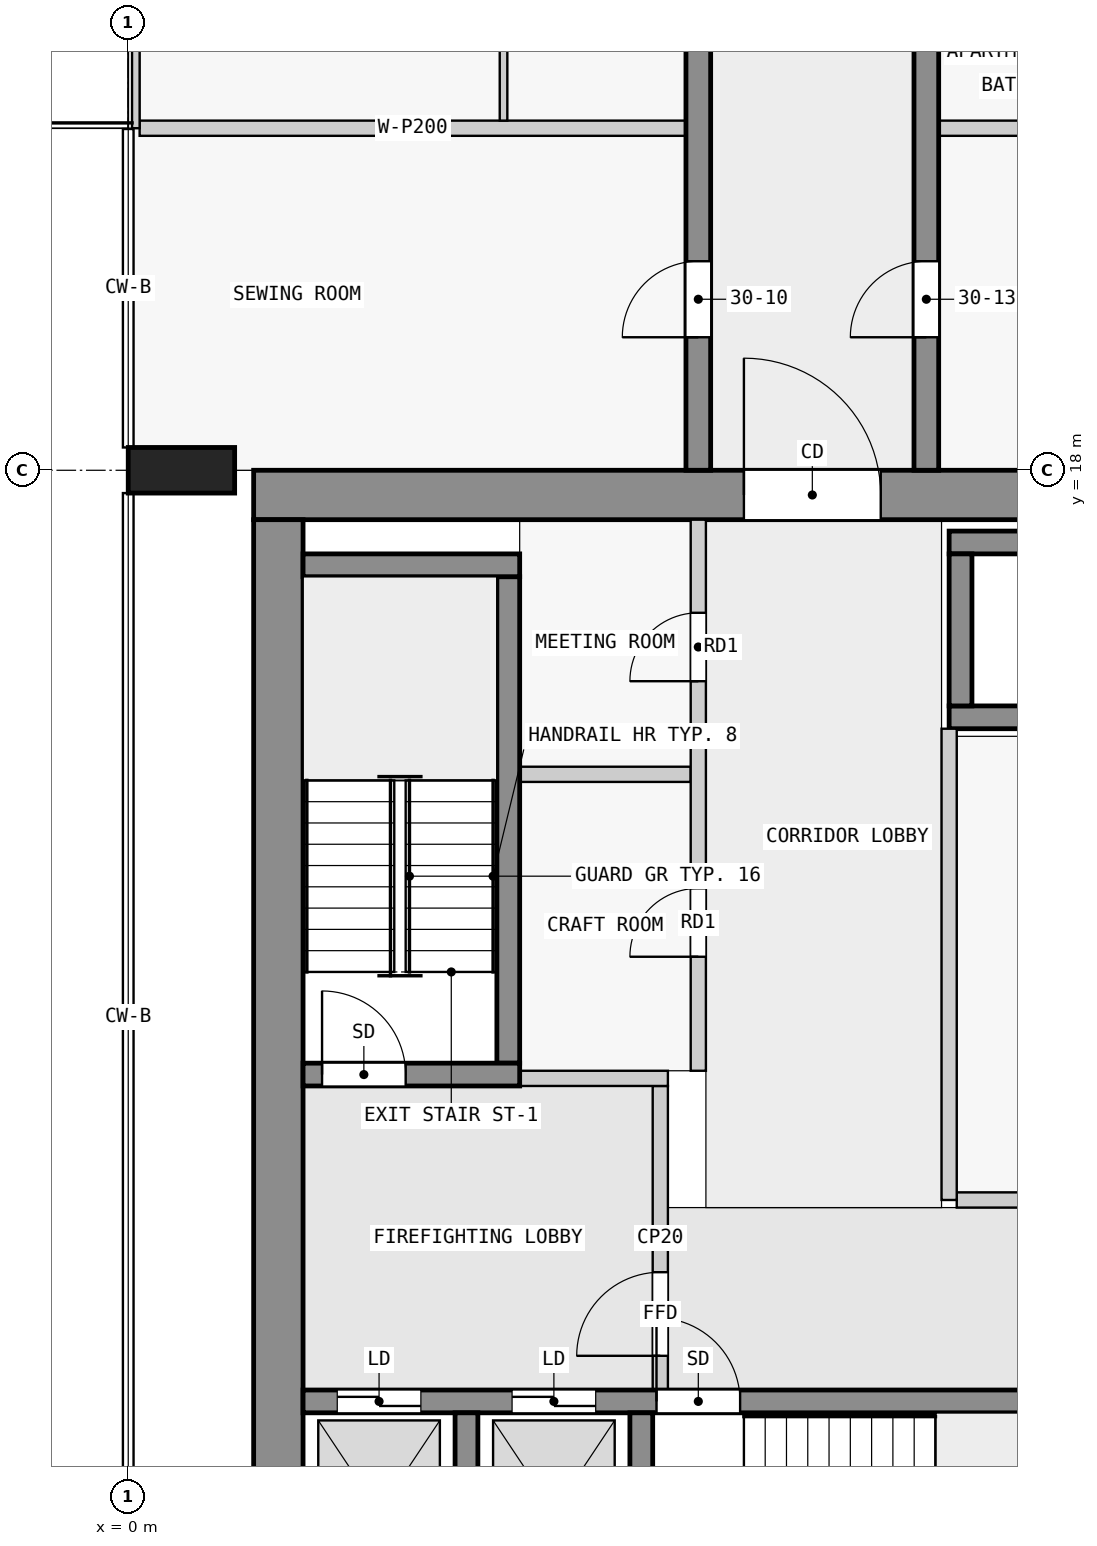
"""IFC4 building model, lengths in metres.
Left out: names, types, materials, properties, quantities, classifications, styles, units other than length and angle.
Written with IfcOpenShell. Run it as: python <this file> out.ifc"""

import sys

from ifc_helpers import new_model, si_unit, direction, frame, frame_2d, origin, origin_2d, place, context, subcontext, project, spatial, rectangle, extrude, element, fill, save


model = new_model("IFC4")
c1 = context("Model", 3, precision=1e-05, world=origin(), true_north=direction((0.0, 1.0)))
c2 = subcontext(c1, "Body", "Model", "MODEL_VIEW")
j1 = project(units=[si_unit("LENGTHUNIT", "METRE"), si_unit("PLANEANGLEUNIT", "RADIAN")], contexts=[c1])
p1 = place(None, origin())
s1 = spatial("IfcSite", under=j1, at=p1, CompositionType="ELEMENT")
p2 = place(p1, origin())
s2 = spatial("IfcBuilding", under=s1, at=p2, CompositionType="ELEMENT")
p3 = place(p2, frame((0.0, 0.0, 116.8)))
s3 = spatial("IfcBuildingStorey", under=s2, at=p3, CompositionType="ELEMENT", Elevation=116.8)
p4 = place(p3, frame((0.7, 18.0, 0.0), z_axis=(0.0, 0.0, 1.0), x_axis=(0.0, 1.0, 0.0)))
e1 = element("IfcColumn", 1, at=p4, inside=s3, PredefinedType="COLUMN", context=c2, shape_type="SweptSolid", body=[
    extrude(rectangle(XDim=0.6, YDim=1.4, at=origin_2d()), origin(), (0.0, 0.0, 1.0), 3.5),
])
p5 = place(p3, frame((1.65, 17.675, 0.0), z_axis=(0.0, 0.0, 1.0), x_axis=(1.0, 0.0, 0.0)))
e2 = element("IfcWall", 2, at=p5, inside=s3, PredefinedType="SHEAR", context=c2, shape_type="SweptSolid", body=[
    extrude(rectangle(XDim=20.85, YDim=0.65, at=frame_2d((10.425, 0.0))), origin(), (0.0, 0.0, 1.0), 3.25),
])
p6 = place(p5, frame((6.45, 0.0, 0.0)))
e3 = element("IfcOpeningElement", 3, at=p6, cuts=e2, PredefinedType="OPENING", context=c2, shape_type="SweptSolid", body=[
    extrude(rectangle(XDim=1.8, YDim=2.1, at=frame_2d((0.9, 1.05))), frame((0.0, 0.335, 0.0), z_axis=(0.0, -1.0, 0.0), x_axis=(1.0, 0.0, 0.0)), (0.0, 0.0, 1.0), 0.67),
])
p7 = place(p3, frame((1.975, 2.5, 0.0), z_axis=(0.0, 0.0, 1.0), x_axis=(0.0, 1.0, 0.0)))
e4 = element("IfcWall", 4, at=p7, inside=s3, PredefinedType="SHEAR", context=c2, shape_type="SweptSolid", body=[
    extrude(rectangle(XDim=14.85, YDim=0.65, at=frame_2d((7.425, 0.0))), origin(), (0.0, 0.0, 1.0), 3.25),
])
for number, where, z_axis, x_axis in (
    (5, (4.45, 2.8, 0.0), (0.0, 0.0, 1.0), (0.0, 1.0, 0.0)),
    (6, (6.75, 2.8, 0.0), (0.0, 0.0, 1.0), (0.0, 1.0, 0.0)),
):
    element("IfcWall", number, at=place(p3, frame(where, z_axis=z_axis, x_axis=x_axis)), inside=s3, PredefinedType="SHEAR", context=c2, shape_type="SweptSolid", body=[
        extrude(rectangle(XDim=2.8, YDim=0.3, at=frame_2d((1.4, 0.0))), origin(), (0.0, 0.0, 1.0), 3.25),
    ])
p8 = place(p3, frame((2.3, 5.75, 0.0), z_axis=(0.0, 0.0, 1.0), x_axis=(1.0, 0.0, 0.0)))
e7 = element("IfcWall", 7, at=p8, inside=s3, PredefinedType="SHEAR", context=c2, shape_type="SweptSolid", body=[
    extrude(rectangle(XDim=18.8, YDim=0.3, at=frame_2d((9.4, 0.0))), origin(), (0.0, 0.0, 1.0), 3.25),
])
p9 = place(p8, frame((4.65, 0.0, 0.0)))
e8 = element("IfcOpeningElement", 8, at=p9, cuts=e7, PredefinedType="OPENING", context=c2, shape_type="SweptSolid", body=[
    extrude(rectangle(XDim=1.1, YDim=2.1, at=frame_2d((0.55, 1.05))), frame((0.0, 0.16, 0.0), z_axis=(0.0, -1.0, 0.0), x_axis=(1.0, 0.0, 0.0)), (0.0, 0.0, 1.0), 0.32),
])
p10 = place(p8, frame((0.45, 0.0, 0.0)))
e9 = element("IfcOpeningElement", 9, at=p10, cuts=e7, PredefinedType="OPENING", context=c2, shape_type="SweptSolid", body=[
    extrude(rectangle(XDim=1.1, YDim=2.1, at=frame_2d((0.55, 1.05))), frame((0.0, 0.16, 0.0), z_axis=(0.0, -1.0, 0.0), x_axis=(1.0, 0.0, 0.0)), (0.0, 0.0, 1.0), 0.32),
])
p11 = place(p8, frame((2.75, 0.0, 0.0)))
e10 = element("IfcOpeningElement", 10, at=p11, cuts=e7, PredefinedType="OPENING", context=c2, shape_type="SweptSolid", body=[
    extrude(rectangle(XDim=1.1, YDim=2.1, at=frame_2d((0.55, 1.05))), frame((0.0, 0.16, 0.0), z_axis=(0.0, -1.0, 0.0), x_axis=(1.0, 0.0, 0.0)), (0.0, 0.0, 1.0), 0.32),
])
p12 = place(p8, frame((11.85, 0.0, 0.0)))
e11 = element("IfcOpeningElement", 11, at=p12, cuts=e7, PredefinedType="OPENING", context=c2, shape_type="SweptSolid", body=[
    extrude(rectangle(XDim=1.1, YDim=2.1, at=frame_2d((0.55, 1.05))), frame((0.0, 0.16, 0.0), z_axis=(0.0, -1.0, 0.0), x_axis=(1.0, 0.0, 0.0)), (0.0, 0.0, 1.0), 0.32),
])
p13 = place(p8, frame((14.35, 0.0, 0.0)))
e12 = element("IfcOpeningElement", 12, at=p13, cuts=e7, PredefinedType="OPENING", context=c2, shape_type="SweptSolid", body=[
    extrude(rectangle(XDim=1.1, YDim=2.1, at=frame_2d((0.55, 1.05))), frame((0.0, 0.16, 0.0), z_axis=(0.0, -1.0, 0.0), x_axis=(1.0, 0.0, 0.0)), (0.0, 0.0, 1.0), 0.32),
])
p14 = place(p8, frame((16.85, 0.0, 0.0)))
e13 = element("IfcOpeningElement", 13, at=p14, cuts=e7, PredefinedType="OPENING", context=c2, shape_type="SweptSolid", body=[
    extrude(rectangle(XDim=1.1, YDim=2.1, at=frame_2d((0.55, 1.05))), frame((0.0, 0.16, 0.0), z_axis=(0.0, -1.0, 0.0), x_axis=(1.0, 0.0, 0.0)), (0.0, 0.0, 1.0), 0.32),
])
p15 = place(p3, frame((2.3, 10.05, 0.0), z_axis=(0.0, 0.0, 1.0), x_axis=(1.0, 0.0, 0.0)))
e14 = element("IfcWall", 14, at=p15, inside=s3, PredefinedType="SHEAR", context=c2, shape_type="SweptSolid", body=[
    extrude(rectangle(XDim=2.85, YDim=0.3, at=frame_2d((1.425, 0.0))), origin(), (0.0, 0.0, 1.0), 3.25),
])
p16 = place(p15, frame((0.25, 0.0, 0.0)))
e15 = element("IfcOpeningElement", 15, at=p16, cuts=e14, PredefinedType="OPENING", context=c2, shape_type="SweptSolid", body=[
    extrude(rectangle(XDim=1.1, YDim=2.1, at=frame_2d((0.55, 1.05))), frame((0.0, 0.16, 0.0), z_axis=(0.0, -1.0, 0.0), x_axis=(1.0, 0.0, 0.0)), (0.0, 0.0, 1.0), 0.32),
])
p17 = place(p3, frame((5.0, 10.2, 0.0), z_axis=(0.0, 0.0, 1.0), x_axis=(0.0, 1.0, 0.0)))
e16 = element("IfcWall", 16, at=p17, inside=s3, PredefinedType="SHEAR", context=c2, shape_type="SweptSolid", body=[
    extrude(rectangle(XDim=6.4, YDim=0.3, at=frame_2d((3.2, 0.0))), origin(), (0.0, 0.0, 1.0), 3.25),
])
p18 = place(p3, frame((2.3, 16.75, 0.0), z_axis=(0.0, 0.0, 1.0), x_axis=(1.0, 0.0, 0.0)))
e17 = element("IfcWall", 17, at=p18, inside=s3, PredefinedType="SHEAR", context=c2, shape_type="SweptSolid", body=[
    extrude(rectangle(XDim=2.85, YDim=0.3, at=frame_2d((1.425, 0.0))), origin(), (0.0, 0.0, 1.0), 3.25),
])
for number, where, z_axis, x_axis in (
    (18, (10.8, 17.05, 0.0), (0.0, 0.0, 1.0), (1.0, 0.0, 0.0)),
    (19, (10.8, 14.75, 0.0), (0.0, 0.0, 1.0), (1.0, 0.0, 0.0)),
):
    element("IfcWall", number, at=place(p3, frame(where, z_axis=z_axis, x_axis=x_axis)), inside=s3, PredefinedType="SHEAR", context=c2, shape_type="SweptSolid", body=[
        extrude(rectangle(XDim=7.8, YDim=0.3, at=frame_2d((3.9, 0.0))), origin(), (0.0, 0.0, 1.0), 3.25),
    ])
p19 = place(p3, frame((10.95, 14.9, 0.0), z_axis=(0.0, 0.0, 1.0), x_axis=(0.0, 1.0, 0.0)))
e20 = element("IfcWall", 20, at=p19, inside=s3, PredefinedType="SHEAR", context=c2, shape_type="SweptSolid", body=[
    extrude(rectangle(XDim=2.0, YDim=0.3, at=frame_2d((1.0, 0.0))), origin(), (0.0, 0.0, 1.0), 3.25),
])
p20 = place(p3, frame((7.5, 18.0, 0.0), z_axis=(0.0, 0.0, 1.0), x_axis=(0.0, 1.0, 0.0)))
e21 = element("IfcWall", 21, at=p20, inside=s3, PredefinedType="SHEAR", context=c2, shape_type="SweptSolid", body=[
    extrude(rectangle(XDim=27.0, YDim=0.325, at=frame_2d((13.5, 0.0))), origin(), (0.0, 0.0, 1.0), 3.25),
])
p21 = place(p20, frame((1.75, 0.0, 0.0)))
e22 = element("IfcOpeningElement", 22, at=p21, cuts=e21, PredefinedType="OPENING", context=c2, shape_type="SweptSolid", body=[
    extrude(rectangle(XDim=1.0, YDim=2.1, at=frame_2d((0.5, 1.05))), frame((0.0, 0.172, 0.0), z_axis=(0.0, -1.0, 0.0), x_axis=(1.0, 0.0, 0.0)), (0.0, 0.0, 1.0), 0.345),
])
p22 = place(p20, frame((9.25, 0.0, 0.0)))
e23 = element("IfcOpeningElement", 23, at=p22, cuts=e21, PredefinedType="OPENING", context=c2, shape_type="SweptSolid", body=[
    extrude(rectangle(XDim=1.0, YDim=2.1, at=frame_2d((0.5, 1.05))), frame((0.0, 0.172, 0.0), z_axis=(0.0, -1.0, 0.0), x_axis=(1.0, 0.0, 0.0)), (0.0, 0.0, 1.0), 0.345),
])
p23 = place(p20, frame((21.35, 0.0, 0.0)))
e24 = element("IfcOpeningElement", 24, at=p23, cuts=e21, PredefinedType="OPENING", context=c2, shape_type="SweptSolid", body=[
    extrude(rectangle(XDim=1.0, YDim=2.1, at=frame_2d((0.5, 1.05))), frame((0.0, 0.172, 0.0), z_axis=(0.0, -1.0, 0.0), x_axis=(1.0, 0.0, 0.0)), (0.0, 0.0, 1.0), 0.345),
])
p24 = place(p3, frame((10.5, 18.0, 0.0), z_axis=(0.0, 0.0, 1.0), x_axis=(0.0, 1.0, 0.0)))
e25 = element("IfcWall", 25, at=p24, inside=s3, PredefinedType="SHEAR", context=c2, shape_type="SweptSolid", body=[
    extrude(rectangle(XDim=27.0, YDim=0.325, at=frame_2d((13.5, 0.0))), origin(), (0.0, 0.0, 1.0), 3.25),
])
p25 = place(p24, frame((1.75, 0.0, 0.0)))
e26 = element("IfcOpeningElement", 26, at=p25, cuts=e25, PredefinedType="OPENING", context=c2, shape_type="SweptSolid", body=[
    extrude(rectangle(XDim=1.0, YDim=2.1, at=frame_2d((0.5, 1.05))), frame((0.0, 0.172, 0.0), z_axis=(0.0, -1.0, 0.0), x_axis=(1.0, 0.0, 0.0)), (0.0, 0.0, 1.0), 0.345),
])
p26 = place(p24, frame((6.25, 0.0, 0.0)))
e27 = element("IfcOpeningElement", 27, at=p26, cuts=e25, PredefinedType="OPENING", context=c2, shape_type="SweptSolid", body=[
    extrude(rectangle(XDim=1.0, YDim=2.1, at=frame_2d((0.5, 1.05))), frame((0.0, 0.172, 0.0), z_axis=(0.0, -1.0, 0.0), x_axis=(1.0, 0.0, 0.0)), (0.0, 0.0, 1.0), 0.345),
])
p27 = place(p24, frame((13.05, 0.0, 0.0)))
e28 = element("IfcOpeningElement", 28, at=p27, cuts=e25, PredefinedType="OPENING", context=c2, shape_type="SweptSolid", body=[
    extrude(rectangle(XDim=1.0, YDim=2.1, at=frame_2d((0.5, 1.05))), frame((0.0, 0.172, 0.0), z_axis=(0.0, -1.0, 0.0), x_axis=(1.0, 0.0, 0.0)), (0.0, 0.0, 1.0), 0.345),
])
p28 = place(p24, frame((19.75, 0.0, 0.0)))
e29 = element("IfcOpeningElement", 29, at=p28, cuts=e25, PredefinedType="OPENING", context=c2, shape_type="SweptSolid", body=[
    extrude(rectangle(XDim=1.0, YDim=2.1, at=frame_2d((0.5, 1.05))), frame((0.0, 0.172, 0.0), z_axis=(0.0, -1.0, 0.0), x_axis=(1.0, 0.0, 0.0)), (0.0, 0.0, 1.0), 0.345),
])
p29 = place(p24, frame((23.25, 0.0, 0.0)))
e30 = element("IfcOpeningElement", 30, at=p29, cuts=e25, PredefinedType="OPENING", context=c2, shape_type="SweptSolid", body=[
    extrude(rectangle(XDim=0.9, YDim=2.1, at=frame_2d((0.45, 1.05))), frame((0.0, 0.172, 0.0), z_axis=(0.0, -1.0, 0.0), x_axis=(1.0, 0.0, 0.0)), (0.0, 0.0, 1.0), 0.345),
])
p30 = place(p24, frame((25.45, 0.0, 0.0)))
e31 = element("IfcOpeningElement", 31, at=p30, cuts=e25, PredefinedType="OPENING", context=c2, shape_type="SweptSolid", body=[
    extrude(rectangle(XDim=1.0, YDim=2.1, at=frame_2d((0.5, 1.05))), frame((0.0, 0.172, 0.0), z_axis=(0.0, -1.0, 0.0), x_axis=(1.0, 0.0, 0.0)), (0.0, 0.0, 1.0), 0.345),
])
p31 = place(p3, frame((0.1, 22.5, 0.0), z_axis=(0.0, 0.0, 1.0), x_axis=(0.0, 1.0, 0.0)))
e32 = element("IfcWall", 32, at=p31, inside=s3, PredefinedType="STANDARD", context=c2, shape_type="SweptSolid", body=[
    extrude(rectangle(XDim=4.5, YDim=0.1, at=frame_2d((2.25, 0.0))), origin(), (0.0, 0.0, 1.0), 3.25),
])
p32 = place(p31, frame((1.05, 0.0, 0.0)))
e33 = element("IfcOpeningElement", 33, at=p32, cuts=e32, PredefinedType="OPENING", context=c2, shape_type="SweptSolid", body=[
    extrude(rectangle(XDim=2.4, YDim=2.4, at=frame_2d((1.2, 1.2))), frame((0.0, 0.06, 0.0), z_axis=(0.0, -1.0, 0.0), x_axis=(1.0, 0.0, 0.0)), (0.0, 0.0, 1.0), 0.12),
])
p33 = place(p3, frame((7.0, 5.9, 0.0), z_axis=(0.0, 0.0, 1.0), x_axis=(0.0, 1.0, 0.0)))
e34 = element("IfcWall", 34, at=p33, inside=s3, PredefinedType="PARTITIONING", context=c2, shape_type="SweptSolid", body=[
    extrude(rectangle(XDim=4.0, YDim=0.2, at=frame_2d((2.0, 0.0))), origin(), (0.0, 0.0, 1.0), 3.25),
])
p34 = place(p33, frame((0.45, 0.0, 0.0)))
e35 = element("IfcOpeningElement", 35, at=p34, cuts=e34, PredefinedType="OPENING", context=c2, shape_type="SweptSolid", body=[
    extrude(rectangle(XDim=1.1, YDim=2.1, at=frame_2d((0.55, 1.05))), frame((0.0, 0.11, 0.0), z_axis=(0.0, -1.0, 0.0), x_axis=(1.0, 0.0, 0.0)), (0.0, 0.0, 1.0), 0.22),
])
p35 = place(p3, frame((5.15, 10.0, 0.0), z_axis=(0.0, 0.0, 1.0), x_axis=(1.0, 0.0, 0.0)))
e36 = element("IfcWall", 36, at=p35, inside=s3, PredefinedType="PARTITIONING", context=c2, shape_type="SweptSolid", body=[
    extrude(rectangle(XDim=1.95, YDim=0.2, at=frame_2d((0.975, 0.0))), origin(), (0.0, 0.0, 1.0), 3.25),
])
p36 = place(p3, frame((10.8, 8.4, 0.0), z_axis=(0.0, 0.0, 1.0), x_axis=(0.0, 1.0, 0.0)))
e37 = element("IfcWall", 37, at=p36, inside=s3, PredefinedType="PARTITIONING", context=c2, shape_type="SweptSolid", body=[
    extrude(rectangle(XDim=6.2, YDim=0.2, at=frame_2d((3.1, 0.0))), origin(), (0.0, 0.0, 1.0), 3.25),
])
p37 = place(p3, frame((10.9, 8.4, 0.0), z_axis=(0.0, 0.0, 1.0), x_axis=(1.0, 0.0, 0.0)))
e38 = element("IfcWall", 38, at=p37, inside=s3, PredefinedType="PARTITIONING", context=c2, shape_type="SweptSolid", body=[
    extrude(rectangle(XDim=5.0, YDim=0.2, at=frame_2d((2.5, 0.0))), origin(), (0.0, 0.0, 1.0), 3.25),
])
p38 = place(p3, frame((7.5, 10.1, 0.0), z_axis=(0.0, 0.0, 1.0), x_axis=(0.0, 1.0, 0.0)))
e39 = element("IfcWall", 39, at=p38, inside=s3, PredefinedType="PARTITIONING", context=c2, shape_type="SweptSolid", body=[
    extrude(rectangle(XDim=7.25, YDim=0.2, at=frame_2d((3.625, 0.0))), origin(), (0.0, 0.0, 1.0), 3.25),
])
p39 = place(p38, frame((1.5, 0.0, 0.0)))
e40 = element("IfcOpeningElement", 40, at=p39, cuts=e39, PredefinedType="OPENING", context=c2, shape_type="SweptSolid", body=[
    extrude(rectangle(XDim=0.9, YDim=2.1, at=frame_2d((0.45, 1.05))), frame((0.0, 0.11, 0.0), z_axis=(0.0, -1.0, 0.0), x_axis=(1.0, 0.0, 0.0)), (0.0, 0.0, 1.0), 0.22),
])
p40 = place(p38, frame((5.125, 0.0, 0.0)))
e41 = element("IfcOpeningElement", 41, at=p40, cuts=e39, PredefinedType="OPENING", context=c2, shape_type="SweptSolid", body=[
    extrude(rectangle(XDim=0.9, YDim=2.1, at=frame_2d((0.45, 1.05))), frame((0.0, 0.11, 0.0), z_axis=(0.0, -1.0, 0.0), x_axis=(1.0, 0.0, 0.0)), (0.0, 0.0, 1.0), 0.22),
])
p41 = place(p3, frame((5.15, 14.0, 0.0), z_axis=(0.0, 0.0, 1.0), x_axis=(1.0, 0.0, 0.0)))
e42 = element("IfcWall", 42, at=p41, inside=s3, PredefinedType="PARTITIONING", context=c2, shape_type="SweptSolid", body=[
    extrude(rectangle(XDim=2.25, YDim=0.2, at=frame_2d((1.125, 0.0))), origin(), (0.0, 0.0, 1.0), 3.25),
])
for number, where, z_axis, x_axis in (
    (43, (7.337, 22.5, 0.0), (0.0, 0.0, 1.0), (-1.0, 0.0, 0.0)),
    (44, (17.85, 22.5, 0.0), (0.0, 0.0, 1.0), (-1.0, 0.0, 0.0)),
):
    element("IfcWall", number, at=place(p3, frame(where, z_axis=z_axis, x_axis=x_axis)), inside=s3, PredefinedType="PARTITIONING", context=c2, shape_type="SweptSolid", body=[
        extrude(rectangle(XDim=7.188, YDim=0.2, at=frame_2d((3.594, 0.0))), origin(), (0.0, 0.0, 1.0), 3.25),
    ])
p42 = place(p3, frame((4.938, 22.6, 0.0), z_axis=(0.0, 0.0, 1.0), x_axis=(0.0, 1.0, 0.0)))
e45 = element("IfcWall", 45, at=p42, inside=s3, PredefinedType="PARTITIONING", context=c2, shape_type="SweptSolid", body=[
    extrude(rectangle(XDim=8.9, YDim=0.1, at=frame_2d((4.45, 0.0))), origin(), (0.0, 0.0, 1.0), 3.25),
])
p43 = place(p42, frame((1.85, 0.0, 0.0)))
e46 = element("IfcOpeningElement", 46, at=p43, cuts=e45, PredefinedType="OPENING", context=c2, shape_type="SweptSolid", body=[
    extrude(rectangle(XDim=0.9, YDim=2.1, at=frame_2d((0.45, 1.05))), frame((0.0, 0.06, 0.0), z_axis=(0.0, -1.0, 0.0), x_axis=(1.0, 0.0, 0.0)), (0.0, 0.0, 1.0), 0.12),
])
p44 = place(p34, origin())
e47 = element("IfcDoor", 47, at=p44, inside=s3, OperationType="SINGLE_SWING_LEFT", PredefinedType="DOOR", context=c2, shape_type="SweptSolid", body=[
    extrude(rectangle(XDim=1.1, YDim=2.1, at=frame_2d((0.55, 1.05))), frame((0.0, 0.025, 0.0), z_axis=(0.0, -1.0, 0.0), x_axis=(1.0, 0.0, 0.0)), (0.0, 0.0, 1.0), 0.05),
])
fill(e35, e47)
p45 = place(p16, origin())
e48 = element("IfcDoor", 48, at=p45, inside=s3, OperationType="SINGLE_SWING_RIGHT", PredefinedType="DOOR", context=c2, shape_type="SweptSolid", body=[
    extrude(rectangle(XDim=1.1, YDim=2.1, at=frame_2d((0.55, 1.05))), frame((0.0, 0.025, 0.0), z_axis=(0.0, -1.0, 0.0), x_axis=(1.0, 0.0, 0.0)), (0.0, 0.0, 1.0), 0.05),
])
fill(e15, e48)
p46 = place(p9, origin())
e49 = element("IfcDoor", 49, at=p46, inside=s3, OperationType="SINGLE_SWING_LEFT", PredefinedType="DOOR", context=c2, shape_type="SweptSolid", body=[
    extrude(rectangle(XDim=1.1, YDim=2.1, at=frame_2d((0.55, 1.05))), frame((0.0, 0.025, 0.0), z_axis=(0.0, -1.0, 0.0), x_axis=(1.0, 0.0, 0.0)), (0.0, 0.0, 1.0), 0.05),
])
fill(e8, e49)
p47 = place(p10, origin())
e50 = element("IfcDoor", 50, at=p47, inside=s3, OperationType="DOUBLE_DOOR_SLIDING", PredefinedType="DOOR", context=c2, shape_type="SweptSolid", body=[
    extrude(rectangle(XDim=1.1, YDim=2.1, at=frame_2d((0.55, 1.05))), frame((0.0, 0.025, 0.0), z_axis=(0.0, -1.0, 0.0), x_axis=(1.0, 0.0, 0.0)), (0.0, 0.0, 1.0), 0.05),
])
fill(e9, e50)
p48 = place(p11, origin())
e51 = element("IfcDoor", 51, at=p48, inside=s3, OperationType="DOUBLE_DOOR_SLIDING", PredefinedType="DOOR", context=c2, shape_type="SweptSolid", body=[
    extrude(rectangle(XDim=1.1, YDim=2.1, at=frame_2d((0.55, 1.05))), frame((0.0, 0.025, 0.0), z_axis=(0.0, -1.0, 0.0), x_axis=(1.0, 0.0, 0.0)), (0.0, 0.0, 1.0), 0.05),
])
fill(e10, e51)
p49 = place(p6, origin())
e52 = element("IfcDoor", 52, at=p49, inside=s3, OperationType="DOUBLE_DOOR_SINGLE_SWING", PredefinedType="DOOR", context=c2, shape_type="SweptSolid", body=[
    extrude(rectangle(XDim=1.8, YDim=2.1, at=frame_2d((0.9, 1.05))), frame((0.0, 0.025, 0.0), z_axis=(0.0, -1.0, 0.0), x_axis=(1.0, 0.0, 0.0)), (0.0, 0.0, 1.0), 0.05),
])
fill(e3, e52)
p50 = place(p39, origin())
e53 = element("IfcDoor", 53, at=p50, inside=s3, OperationType="SINGLE_SWING_RIGHT", PredefinedType="DOOR", context=c2, shape_type="SweptSolid", body=[
    extrude(rectangle(XDim=0.9, YDim=2.1, at=frame_2d((0.45, 1.05))), frame((0.0, 0.025, 0.0), z_axis=(0.0, -1.0, 0.0), x_axis=(1.0, 0.0, 0.0)), (0.0, 0.0, 1.0), 0.05),
])
fill(e40, e53)
p51 = place(p40, origin())
e54 = element("IfcDoor", 54, at=p51, inside=s3, OperationType="SINGLE_SWING_RIGHT", PredefinedType="DOOR", context=c2, shape_type="SweptSolid", body=[
    extrude(rectangle(XDim=0.9, YDim=2.1, at=frame_2d((0.45, 1.05))), frame((0.0, 0.025, 0.0), z_axis=(0.0, -1.0, 0.0), x_axis=(1.0, 0.0, 0.0)), (0.0, 0.0, 1.0), 0.05),
])
fill(e41, e54)
p52 = place(p21, origin())
e55 = element("IfcDoor", 55, at=p52, inside=s3, OperationType="SINGLE_SWING_LEFT", PredefinedType="DOOR", context=c2, shape_type="SweptSolid", body=[
    extrude(rectangle(XDim=1.0, YDim=2.1, at=frame_2d((0.5, 1.05))), frame((0.0, 0.025, 0.0), z_axis=(0.0, -1.0, 0.0), x_axis=(1.0, 0.0, 0.0)), (0.0, 0.0, 1.0), 0.05),
])
fill(e22, e55)
p53 = place(p25, origin())
e56 = element("IfcDoor", 56, at=p53, inside=s3, OperationType="SINGLE_SWING_LEFT", PredefinedType="DOOR", context=c2, shape_type="SweptSolid", body=[
    extrude(rectangle(XDim=1.0, YDim=2.1, at=frame_2d((0.5, 1.05))), frame((0.0, 0.025, 0.0), z_axis=(0.0, -1.0, 0.0), x_axis=(1.0, 0.0, 0.0)), (0.0, 0.0, 1.0), 0.05),
])
fill(e26, e56)
save(model, sys.argv[1])
